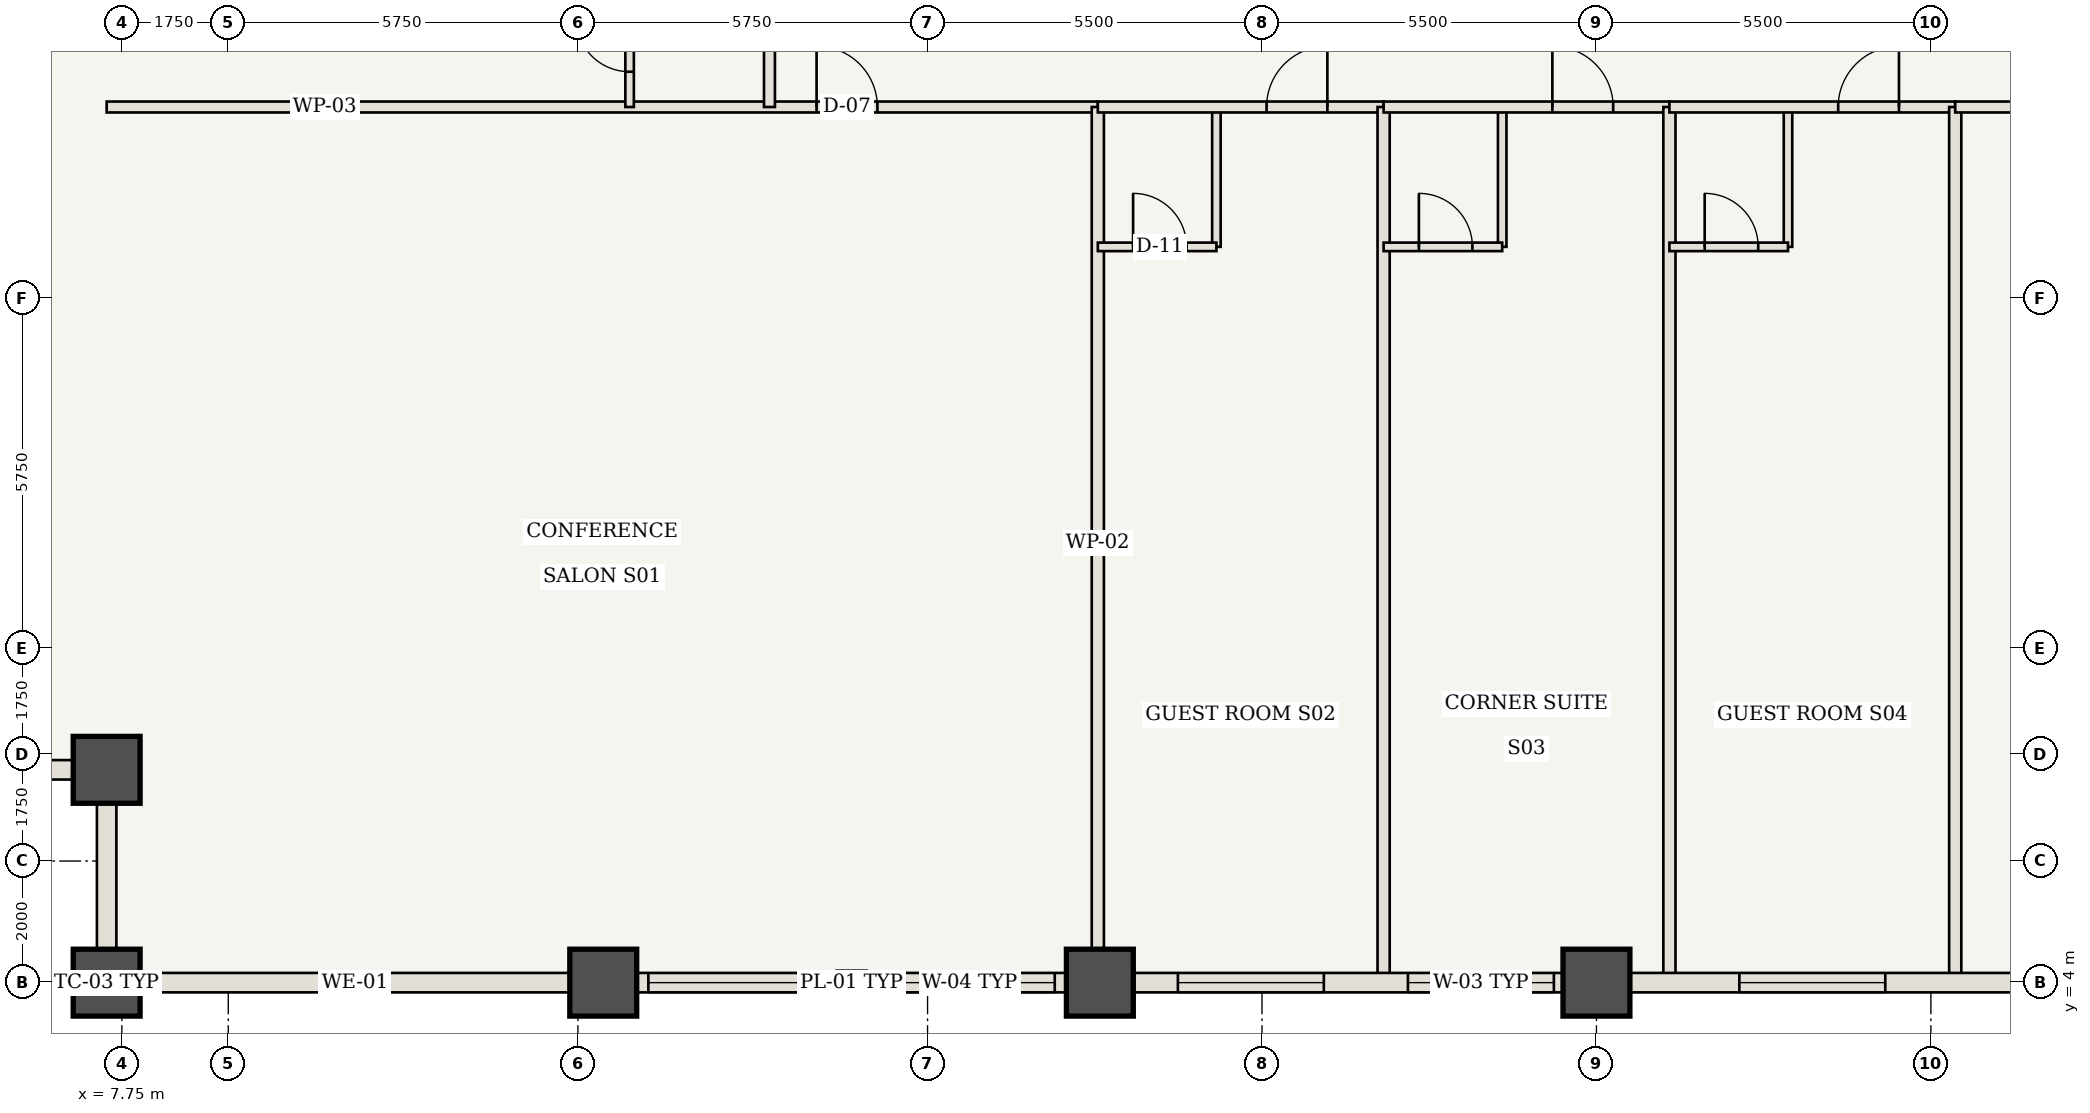
"""IFC4 building model, lengths in metres.
Left out: names, types, materials, properties, quantities, classifications, styles, units other than length and angle.
Written with IfcOpenShell. Run it as: python <this file> out.ifc"""

import sys

from ifc_helpers import new_model, si_unit, direction, frame, frame_2d, origin, origin_2d, place, context, subcontext, project, spatial, rectangle, extrude, element, fill, save


model = new_model("IFC4")
c1 = context("Model", 3, precision=1e-05, world=origin(), true_north=direction((0.0, 1.0)))
c2 = subcontext(c1, "Body", "Model", "MODEL_VIEW")
j1 = project(units=[si_unit("LENGTHUNIT", "METRE"), si_unit("PLANEANGLEUNIT", "RADIAN")], contexts=[c1])
p1 = place(None, origin())
s1 = spatial("IfcSite", under=j1, at=p1, CompositionType="ELEMENT")
p2 = place(p1, origin())
s2 = spatial("IfcBuilding", under=s1, at=p2, CompositionType="ELEMENT")
p3 = place(p2, frame((0.0, 0.0, 42.35)))
s3 = spatial("IfcBuildingStorey", under=s2, at=p3, CompositionType="ELEMENT", Elevation=42.35)
for number, where, z_axis, x_axis in (
    (1, (7.5, 4.0, 0.0), (0.0, 0.0, 1.0), (1.0, 0.0, 0.0)),
    (2, (7.5, 7.5, 0.0), (0.0, 0.0, 1.0), (1.0, 0.0, 0.0)),
    (3, (15.667, 4.0, 0.0), (0.0, 0.0, 1.0), (1.0, 0.0, 0.0)),
    (4, (23.833, 4.0, 0.0), (0.0, 0.0, 1.0), (1.0, 0.0, 0.0)),
    (5, (32.0, 4.0, 0.0), (0.0, 0.0, 1.0), (1.0, 0.0, 0.0)),
):
    element("IfcColumn", number, at=place(p3, frame(where, z_axis=z_axis, x_axis=x_axis)), inside=s3, PredefinedType="COLUMN", context=c2, shape_type="SweptSolid", body=[
        extrude(rectangle(XDim=1.1, YDim=1.1, at=origin_2d()), origin(), (0.0, 0.0, 1.0), 3.5),
    ])
p4 = place(p3, frame((7.5, 18.4, 0.0), z_axis=(0.0, 0.0, 1.0), x_axis=(1.0, 0.0, 0.0)))
e6 = element("IfcWall", 6, at=p4, inside=s3, PredefinedType="STANDARD", context=c2, shape_type="SweptSolid", body=[
    extrude(rectangle(XDim=16.3, YDim=0.18, at=frame_2d((8.15, 0.0))), origin(), (0.0, 0.0, 1.0), 3.32),
])
p5 = place(p4, frame((11.675, 0.0, 0.0)))
e7 = element("IfcOpeningElement", 7, at=p5, cuts=e6, PredefinedType="OPENING", context=c2, shape_type="SweptSolid", body=[
    extrude(rectangle(XDim=1.0, YDim=2.15, at=frame_2d((0.5, 1.075))), frame((0.0, 0.1, 0.0), z_axis=(0.0, -1.0, 0.0), x_axis=(1.0, 0.0, 0.0)), (0.0, 0.0, 1.0), 0.2),
])
p6 = place(p3, frame((23.8, 4.06, 0.0), z_axis=(0.0, 0.0, 1.0), x_axis=(0.0, 1.0, 0.0)))
e8 = element("IfcWall", 8, at=p6, inside=s3, PredefinedType="STANDARD", context=c2, shape_type="SweptSolid", body=[
    extrude(rectangle(XDim=14.34, YDim=0.2, at=frame_2d((7.17, 0.0))), origin(), (0.0, 0.0, 1.0), 3.32),
])
p7 = place(p3, frame((25.75, 16.1, 0.0), z_axis=(0.0, 0.0, 1.0), x_axis=(0.0, 1.0, 0.0)))
e9 = element("IfcWall", 9, at=p7, inside=s3, PredefinedType="STANDARD", context=c2, shape_type="SweptSolid", body=[
    extrude(rectangle(XDim=2.3, YDim=0.14, at=frame_2d((1.15, 0.0))), origin(), (0.0, 0.0, 1.0), 3.32),
])
p8 = place(p3, frame((23.8, 16.1, 0.0), z_axis=(0.0, 0.0, 1.0), x_axis=(1.0, 0.0, 0.0)))
e10 = element("IfcWall", 10, at=p8, inside=s3, PredefinedType="STANDARD", context=c2, shape_type="SweptSolid", body=[
    extrude(rectangle(XDim=1.95, YDim=0.14, at=frame_2d((0.975, 0.0))), origin(), (0.0, 0.0, 1.0), 3.32),
])
p9 = place(p8, frame((0.58, 0.0, 0.0)))
e11 = element("IfcOpeningElement", 11, at=p9, cuts=e10, PredefinedType="OPENING", context=c2, shape_type="SweptSolid", body=[
    extrude(rectangle(XDim=0.88, YDim=2.1, at=frame_2d((0.44, 1.05))), frame((0.0, 0.08, 0.0), z_axis=(0.0, -1.0, 0.0), x_axis=(1.0, 0.0, 0.0)), (0.0, 0.0, 1.0), 0.16),
])
p10 = place(p3, frame((23.8, 18.4, 0.0), z_axis=(0.0, 0.0, 1.0), x_axis=(1.0, 0.0, 0.0)))
e12 = element("IfcWall", 12, at=p10, inside=s3, PredefinedType="STANDARD", context=c2, shape_type="SweptSolid", body=[
    extrude(rectangle(XDim=4.7, YDim=0.18, at=frame_2d((2.35, 0.0))), origin(), (0.0, 0.0, 1.0), 3.32),
])
p11 = place(p10, frame((2.775, 0.0, 0.0)))
e13 = element("IfcOpeningElement", 13, at=p11, cuts=e12, PredefinedType="OPENING", context=c2, shape_type="SweptSolid", body=[
    extrude(rectangle(XDim=1.0, YDim=2.15, at=frame_2d((0.5, 1.075))), frame((0.0, 0.1, 0.0), z_axis=(0.0, -1.0, 0.0), x_axis=(1.0, 0.0, 0.0)), (0.0, 0.0, 1.0), 0.2),
])
p12 = place(p3, frame((28.5, 4.06, 0.0), z_axis=(0.0, 0.0, 1.0), x_axis=(0.0, 1.0, 0.0)))
e14 = element("IfcWall", 14, at=p12, inside=s3, PredefinedType="STANDARD", context=c2, shape_type="SweptSolid", body=[
    extrude(rectangle(XDim=14.34, YDim=0.2, at=frame_2d((7.17, 0.0))), origin(), (0.0, 0.0, 1.0), 3.32),
])
p13 = place(p3, frame((30.45, 16.1, 0.0), z_axis=(0.0, 0.0, 1.0), x_axis=(0.0, 1.0, 0.0)))
e15 = element("IfcWall", 15, at=p13, inside=s3, PredefinedType="STANDARD", context=c2, shape_type="SweptSolid", body=[
    extrude(rectangle(XDim=2.3, YDim=0.14, at=frame_2d((1.15, 0.0))), origin(), (0.0, 0.0, 1.0), 3.32),
])
p14 = place(p3, frame((28.5, 16.1, 0.0), z_axis=(0.0, 0.0, 1.0), x_axis=(1.0, 0.0, 0.0)))
e16 = element("IfcWall", 16, at=p14, inside=s3, PredefinedType="STANDARD", context=c2, shape_type="SweptSolid", body=[
    extrude(rectangle(XDim=1.95, YDim=0.14, at=frame_2d((0.975, 0.0))), origin(), (0.0, 0.0, 1.0), 3.32),
])
p15 = place(p14, frame((0.58, 0.0, 0.0)))
e17 = element("IfcOpeningElement", 17, at=p15, cuts=e16, PredefinedType="OPENING", context=c2, shape_type="SweptSolid", body=[
    extrude(rectangle(XDim=0.88, YDim=2.1, at=frame_2d((0.44, 1.05))), frame((0.0, 0.08, 0.0), z_axis=(0.0, -1.0, 0.0), x_axis=(1.0, 0.0, 0.0)), (0.0, 0.0, 1.0), 0.16),
])
p16 = place(p3, frame((28.5, 18.4, 0.0), z_axis=(0.0, 0.0, 1.0), x_axis=(1.0, 0.0, 0.0)))
e18 = element("IfcWall", 18, at=p16, inside=s3, PredefinedType="STANDARD", context=c2, shape_type="SweptSolid", body=[
    extrude(rectangle(XDim=4.7, YDim=0.18, at=frame_2d((2.35, 0.0))), origin(), (0.0, 0.0, 1.0), 3.32),
])
p17 = place(p16, frame((2.775, 0.0, 0.0)))
e19 = element("IfcOpeningElement", 19, at=p17, cuts=e18, PredefinedType="OPENING", context=c2, shape_type="SweptSolid", body=[
    extrude(rectangle(XDim=1.0, YDim=2.15, at=frame_2d((0.5, 1.075))), frame((0.0, 0.1, 0.0), z_axis=(0.0, -1.0, 0.0), x_axis=(1.0, 0.0, 0.0)), (0.0, 0.0, 1.0), 0.2),
])
p18 = place(p3, frame((33.2, 4.06, 0.0), z_axis=(0.0, 0.0, 1.0), x_axis=(0.0, 1.0, 0.0)))
e20 = element("IfcWall", 20, at=p18, inside=s3, PredefinedType="STANDARD", context=c2, shape_type="SweptSolid", body=[
    extrude(rectangle(XDim=14.34, YDim=0.2, at=frame_2d((7.17, 0.0))), origin(), (0.0, 0.0, 1.0), 3.32),
])
p19 = place(p3, frame((35.15, 16.1, 0.0), z_axis=(0.0, 0.0, 1.0), x_axis=(0.0, 1.0, 0.0)))
e21 = element("IfcWall", 21, at=p19, inside=s3, PredefinedType="STANDARD", context=c2, shape_type="SweptSolid", body=[
    extrude(rectangle(XDim=2.3, YDim=0.14, at=frame_2d((1.15, 0.0))), origin(), (0.0, 0.0, 1.0), 3.32),
])
p20 = place(p3, frame((33.2, 16.1, 0.0), z_axis=(0.0, 0.0, 1.0), x_axis=(1.0, 0.0, 0.0)))
e22 = element("IfcWall", 22, at=p20, inside=s3, PredefinedType="STANDARD", context=c2, shape_type="SweptSolid", body=[
    extrude(rectangle(XDim=1.95, YDim=0.14, at=frame_2d((0.975, 0.0))), origin(), (0.0, 0.0, 1.0), 3.32),
])
p21 = place(p20, frame((0.58, 0.0, 0.0)))
e23 = element("IfcOpeningElement", 23, at=p21, cuts=e22, PredefinedType="OPENING", context=c2, shape_type="SweptSolid", body=[
    extrude(rectangle(XDim=0.88, YDim=2.1, at=frame_2d((0.44, 1.05))), frame((0.0, 0.08, 0.0), z_axis=(0.0, -1.0, 0.0), x_axis=(1.0, 0.0, 0.0)), (0.0, 0.0, 1.0), 0.16),
])
p22 = place(p3, frame((33.2, 18.4, 0.0), z_axis=(0.0, 0.0, 1.0), x_axis=(1.0, 0.0, 0.0)))
e24 = element("IfcWall", 24, at=p22, inside=s3, PredefinedType="STANDARD", context=c2, shape_type="SweptSolid", body=[
    extrude(rectangle(XDim=4.7, YDim=0.18, at=frame_2d((2.35, 0.0))), origin(), (0.0, 0.0, 1.0), 3.32),
])
p23 = place(p22, frame((2.775, 0.0, 0.0)))
e25 = element("IfcOpeningElement", 25, at=p23, cuts=e24, PredefinedType="OPENING", context=c2, shape_type="SweptSolid", body=[
    extrude(rectangle(XDim=1.0, YDim=2.15, at=frame_2d((0.5, 1.075))), frame((0.0, 0.1, 0.0), z_axis=(0.0, -1.0, 0.0), x_axis=(1.0, 0.0, 0.0)), (0.0, 0.0, 1.0), 0.2),
])
p24 = place(p3, frame((37.9, 4.06, 0.0), z_axis=(0.0, 0.0, 1.0), x_axis=(0.0, 1.0, 0.0)))
e26 = element("IfcWall", 26, at=p24, inside=s3, PredefinedType="STANDARD", context=c2, shape_type="SweptSolid", body=[
    extrude(rectangle(XDim=14.34, YDim=0.2, at=frame_2d((7.17, 0.0))), origin(), (0.0, 0.0, 1.0), 3.32),
])
p25 = place(p3, frame((37.9, 18.4, 0.0), z_axis=(0.0, 0.0, 1.0), x_axis=(1.0, 0.0, 0.0)))
e27 = element("IfcWall", 27, at=p25, inside=s3, PredefinedType="STANDARD", context=c2, shape_type="SweptSolid", body=[
    extrude(rectangle(XDim=18.6, YDim=0.18, at=frame_2d((9.3, 0.0))), origin(), (0.0, 0.0, 1.0), 3.32),
])
p26 = place(p25, frame((4.775, 0.0, 0.0)))
e28 = element("IfcOpeningElement", 28, at=p26, cuts=e27, PredefinedType="OPENING", context=c2, shape_type="SweptSolid", body=[
    extrude(rectangle(XDim=1.0, YDim=2.15, at=frame_2d((0.5, 1.075))), frame((0.0, 0.1, 0.0), z_axis=(0.0, -1.0, 0.0), x_axis=(1.0, 0.0, 0.0)), (0.0, 0.0, 1.0), 0.2),
])
p27 = place(p3, frame((16.1, 18.4, 0.0), z_axis=(0.0, 0.0, 1.0), x_axis=(0.0, 1.0, 0.0)))
e29 = element("IfcWall", 29, at=p27, inside=s3, PredefinedType="STANDARD", context=c2, shape_type="SweptSolid", body=[
    extrude(rectangle(XDim=1.95, YDim=0.14, at=frame_2d((0.975, 0.0))), origin(), (0.0, 0.0, 1.0), 3.32),
])
p28 = place(p27, frame((0.58, 0.0, 0.0)))
e30 = element("IfcOpeningElement", 30, at=p28, cuts=e29, PredefinedType="OPENING", context=c2, shape_type="SweptSolid", body=[
    extrude(rectangle(XDim=0.88, YDim=2.1, at=frame_2d((0.44, 1.05))), frame((0.0, 0.08, 0.0), z_axis=(0.0, -1.0, 0.0), x_axis=(1.0, 0.0, 0.0)), (0.0, 0.0, 1.0), 0.16),
])
p29 = place(p3, frame((18.4, 18.4, 0.0), z_axis=(0.0, 0.0, 1.0), x_axis=(0.0, 1.0, 0.0)))
e31 = element("IfcWall", 31, at=p29, inside=s3, PredefinedType="STANDARD", context=c2, shape_type="SweptSolid", body=[
    extrude(rectangle(XDim=4.8, YDim=0.18, at=frame_2d((2.4, 0.0))), origin(), (0.0, 0.0, 1.0), 3.32),
])
p30 = place(p29, frame((2.825, 0.0, 0.0)))
e32 = element("IfcOpeningElement", 32, at=p30, cuts=e31, PredefinedType="OPENING", context=c2, shape_type="SweptSolid", body=[
    extrude(rectangle(XDim=1.0, YDim=2.15, at=frame_2d((0.5, 1.075))), frame((0.0, 0.1, 0.0), z_axis=(0.0, -1.0, 0.0), x_axis=(1.0, 0.0, 0.0)), (0.0, 0.0, 1.0), 0.2),
])
p31 = place(p3, frame((15.667, 4.0, 0.0), z_axis=(0.0, 0.0, 1.0), x_axis=(-1.0, 0.0, 0.0)))
e33 = element("IfcWall", 33, at=p31, inside=s3, PredefinedType="USERDEFINED", context=c2, shape_type="SweptSolid", body=[
    extrude(rectangle(XDim=8.167, YDim=0.32, at=frame_2d((4.083, 0.0))), origin(), (0.0, 0.0, 1.0), 2.52),
])
p32 = place(p3, frame((23.833, 4.0, 0.0), z_axis=(0.0, 0.0, 1.0), x_axis=(-1.0, 0.0, 0.0)))
e34 = element("IfcWall", 34, at=p32, inside=s3, PredefinedType="USERDEFINED", context=c2, shape_type="SweptSolid", body=[
    extrude(rectangle(XDim=8.167, YDim=0.32, at=frame_2d((4.083, 0.0))), origin(), (0.0, 0.0, 1.0), 2.52),
])
p33 = place(p32, frame((0.742, 0.0, 0.85)))
e35 = element("IfcOpeningElement", 35, at=p33, cuts=e34, PredefinedType="OPENING", context=c2, shape_type="SweptSolid", body=[
    extrude(rectangle(XDim=2.8, YDim=1.47, at=frame_2d((1.4, 0.735))), frame((0.0, 0.17, 0.0), z_axis=(0.0, -1.0, 0.0), x_axis=(1.0, 0.0, 0.0)), (0.0, 0.0, 1.0), 0.34),
])
p34 = place(p32, frame((4.625, 0.0, 0.85)))
e36 = element("IfcOpeningElement", 36, at=p34, cuts=e34, PredefinedType="OPENING", context=c2, shape_type="SweptSolid", body=[
    extrude(rectangle(XDim=2.8, YDim=1.47, at=frame_2d((1.4, 0.735))), frame((0.0, 0.17, 0.0), z_axis=(0.0, -1.0, 0.0), x_axis=(1.0, 0.0, 0.0)), (0.0, 0.0, 1.0), 0.34),
])
p35 = place(p3, frame((32.0, 4.0, 0.0), z_axis=(0.0, 0.0, 1.0), x_axis=(-1.0, 0.0, 0.0)))
e37 = element("IfcWall", 37, at=p35, inside=s3, PredefinedType="USERDEFINED", context=c2, shape_type="SweptSolid", body=[
    extrude(rectangle(XDim=8.167, YDim=0.32, at=frame_2d((4.083, 0.0))), origin(), (0.0, 0.0, 1.0), 2.52),
])
p36 = place(p35, frame((0.7, 0.0, 0.85)))
e38 = element("IfcOpeningElement", 38, at=p36, cuts=e37, PredefinedType="OPENING", context=c2, shape_type="SweptSolid", body=[
    extrude(rectangle(XDim=2.4, YDim=1.47, at=frame_2d((1.2, 0.735))), frame((0.0, 0.17, 0.0), z_axis=(0.0, -1.0, 0.0), x_axis=(1.0, 0.0, 0.0)), (0.0, 0.0, 1.0), 0.34),
])
p37 = place(p35, frame((4.483, 0.0, 0.85)))
e39 = element("IfcOpeningElement", 39, at=p37, cuts=e37, PredefinedType="OPENING", context=c2, shape_type="SweptSolid", body=[
    extrude(rectangle(XDim=2.4, YDim=1.47, at=frame_2d((1.2, 0.735))), frame((0.0, 0.17, 0.0), z_axis=(0.0, -1.0, 0.0), x_axis=(1.0, 0.0, 0.0)), (0.0, 0.0, 1.0), 0.34),
])
p38 = place(p3, frame((40.167, 4.0, 0.0), z_axis=(0.0, 0.0, 1.0), x_axis=(-1.0, 0.0, 0.0)))
e40 = element("IfcWall", 40, at=p38, inside=s3, PredefinedType="USERDEFINED", context=c2, shape_type="SweptSolid", body=[
    extrude(rectangle(XDim=8.167, YDim=0.32, at=frame_2d((4.083, 0.0))), origin(), (0.0, 0.0, 1.0), 2.52),
])
p39 = place(p38, frame((3.417, 0.0, 0.85)))
e41 = element("IfcOpeningElement", 41, at=p39, cuts=e40, PredefinedType="OPENING", context=c2, shape_type="SweptSolid", body=[
    extrude(rectangle(XDim=2.4, YDim=1.47, at=frame_2d((1.2, 0.735))), frame((0.0, 0.17, 0.0), z_axis=(0.0, -1.0, 0.0), x_axis=(1.0, 0.0, 0.0)), (0.0, 0.0, 1.0), 0.34),
])
for number, where, z_axis, x_axis in (
    (42, (7.5, 4.0, 0.0), (0.0, 0.0, 1.0), (0.0, 1.0, 0.0)),
    (43, (7.5, 7.5, 0.0), (0.0, 0.0, 1.0), (-1.0, 0.0, 0.0)),
):
    element("IfcWall", number, at=place(p3, frame(where, z_axis=z_axis, x_axis=x_axis)), inside=s3, PredefinedType="USERDEFINED", context=c2, shape_type="SweptSolid", body=[
        extrude(rectangle(XDim=3.5, YDim=0.32, at=frame_2d((1.75, 0.0))), origin(), (0.0, 0.0, 1.0), 2.52),
    ])
p40 = place(p5, origin())
e44 = element("IfcDoor", 44, at=p40, inside=s3, OperationType="SINGLE_SWING_LEFT", PredefinedType="DOOR", context=c2, shape_type="SweptSolid", body=[
    extrude(rectangle(XDim=1.0, YDim=2.15, at=frame_2d((0.5, 1.075))), frame((0.0, 0.025, 0.0), z_axis=(0.0, -1.0, 0.0), x_axis=(1.0, 0.0, 0.0)), (0.0, 0.0, 1.0), 0.05),
])
fill(e7, e44)
p41 = place(p9, origin())
e45 = element("IfcDoor", 45, at=p41, inside=s3, OperationType="SINGLE_SWING_LEFT", PredefinedType="DOOR", context=c2, shape_type="SweptSolid", body=[
    extrude(rectangle(XDim=0.88, YDim=2.1, at=frame_2d((0.44, 1.05))), frame((0.0, 0.025, 0.0), z_axis=(0.0, -1.0, 0.0), x_axis=(1.0, 0.0, 0.0)), (0.0, 0.0, 1.0), 0.05),
])
fill(e11, e45)
p42 = place(p11, origin())
e46 = element("IfcDoor", 46, at=p42, inside=s3, OperationType="SINGLE_SWING_RIGHT", PredefinedType="DOOR", context=c2, shape_type="SweptSolid", body=[
    extrude(rectangle(XDim=1.0, YDim=2.15, at=frame_2d((0.5, 1.075))), frame((0.0, 0.025, 0.0), z_axis=(0.0, -1.0, 0.0), x_axis=(1.0, 0.0, 0.0)), (0.0, 0.0, 1.0), 0.05),
])
fill(e13, e46)
p43 = place(p15, origin())
e47 = element("IfcDoor", 47, at=p43, inside=s3, OperationType="SINGLE_SWING_LEFT", PredefinedType="DOOR", context=c2, shape_type="SweptSolid", body=[
    extrude(rectangle(XDim=0.88, YDim=2.1, at=frame_2d((0.44, 1.05))), frame((0.0, 0.025, 0.0), z_axis=(0.0, -1.0, 0.0), x_axis=(1.0, 0.0, 0.0)), (0.0, 0.0, 1.0), 0.05),
])
fill(e17, e47)
p44 = place(p17, origin())
e48 = element("IfcDoor", 48, at=p44, inside=s3, OperationType="SINGLE_SWING_LEFT", PredefinedType="DOOR", context=c2, shape_type="SweptSolid", body=[
    extrude(rectangle(XDim=1.0, YDim=2.15, at=frame_2d((0.5, 1.075))), frame((0.0, 0.025, 0.0), z_axis=(0.0, -1.0, 0.0), x_axis=(1.0, 0.0, 0.0)), (0.0, 0.0, 1.0), 0.05),
])
fill(e19, e48)
p45 = place(p21, origin())
e49 = element("IfcDoor", 49, at=p45, inside=s3, OperationType="SINGLE_SWING_LEFT", PredefinedType="DOOR", context=c2, shape_type="SweptSolid", body=[
    extrude(rectangle(XDim=0.88, YDim=2.1, at=frame_2d((0.44, 1.05))), frame((0.0, 0.025, 0.0), z_axis=(0.0, -1.0, 0.0), x_axis=(1.0, 0.0, 0.0)), (0.0, 0.0, 1.0), 0.05),
])
fill(e23, e49)
p46 = place(p23, origin())
e50 = element("IfcDoor", 50, at=p46, inside=s3, OperationType="SINGLE_SWING_RIGHT", PredefinedType="DOOR", context=c2, shape_type="SweptSolid", body=[
    extrude(rectangle(XDim=1.0, YDim=2.15, at=frame_2d((0.5, 1.075))), frame((0.0, 0.025, 0.0), z_axis=(0.0, -1.0, 0.0), x_axis=(1.0, 0.0, 0.0)), (0.0, 0.0, 1.0), 0.05),
])
fill(e25, e50)
p47 = place(p28, origin())
e51 = element("IfcDoor", 51, at=p47, inside=s3, OperationType="SINGLE_SWING_RIGHT", PredefinedType="DOOR", context=c2, shape_type="SweptSolid", body=[
    extrude(rectangle(XDim=0.88, YDim=2.1, at=frame_2d((0.44, 1.05))), frame((0.0, 0.025, 0.0), z_axis=(0.0, -1.0, 0.0), x_axis=(1.0, 0.0, 0.0)), (0.0, 0.0, 1.0), 0.05),
])
fill(e30, e51)
p48 = place(p33, origin())
e52 = element("IfcWindow", 52, at=p48, inside=s3, PartitioningType="SINGLE_PANEL", PredefinedType="WINDOW", context=c2, shape_type="SweptSolid", body=[
    extrude(rectangle(XDim=2.8, YDim=1.47, at=frame_2d((1.4, 0.735))), frame((0.0, 0.03, 0.0), z_axis=(0.0, -1.0, 0.0), x_axis=(1.0, 0.0, 0.0)), (0.0, 0.0, 1.0), 0.06),
])
fill(e35, e52)
p49 = place(p34, origin())
e53 = element("IfcWindow", 53, at=p49, inside=s3, PartitioningType="SINGLE_PANEL", PredefinedType="WINDOW", context=c2, shape_type="SweptSolid", body=[
    extrude(rectangle(XDim=2.8, YDim=1.47, at=frame_2d((1.4, 0.735))), frame((0.0, 0.03, 0.0), z_axis=(0.0, -1.0, 0.0), x_axis=(1.0, 0.0, 0.0)), (0.0, 0.0, 1.0), 0.06),
])
fill(e36, e53)
p50 = place(p36, origin())
e54 = element("IfcWindow", 54, at=p50, inside=s3, PartitioningType="SINGLE_PANEL", PredefinedType="WINDOW", context=c2, shape_type="SweptSolid", body=[
    extrude(rectangle(XDim=2.4, YDim=1.47, at=frame_2d((1.2, 0.735))), frame((0.0, 0.03, 0.0), z_axis=(0.0, -1.0, 0.0), x_axis=(1.0, 0.0, 0.0)), (0.0, 0.0, 1.0), 0.06),
])
fill(e38, e54)
p51 = place(p37, origin())
e55 = element("IfcWindow", 55, at=p51, inside=s3, PartitioningType="SINGLE_PANEL", PredefinedType="WINDOW", context=c2, shape_type="SweptSolid", body=[
    extrude(rectangle(XDim=2.4, YDim=1.47, at=frame_2d((1.2, 0.735))), frame((0.0, 0.03, 0.0), z_axis=(0.0, -1.0, 0.0), x_axis=(1.0, 0.0, 0.0)), (0.0, 0.0, 1.0), 0.06),
])
fill(e39, e55)
p52 = place(p39, origin())
e56 = element("IfcWindow", 56, at=p52, inside=s3, PartitioningType="SINGLE_PANEL", PredefinedType="WINDOW", context=c2, shape_type="SweptSolid", body=[
    extrude(rectangle(XDim=2.4, YDim=1.47, at=frame_2d((1.2, 0.735))), frame((0.0, 0.03, 0.0), z_axis=(0.0, -1.0, 0.0), x_axis=(1.0, 0.0, 0.0)), (0.0, 0.0, 1.0), 0.06),
])
fill(e41, e56)
save(model, sys.argv[1])
